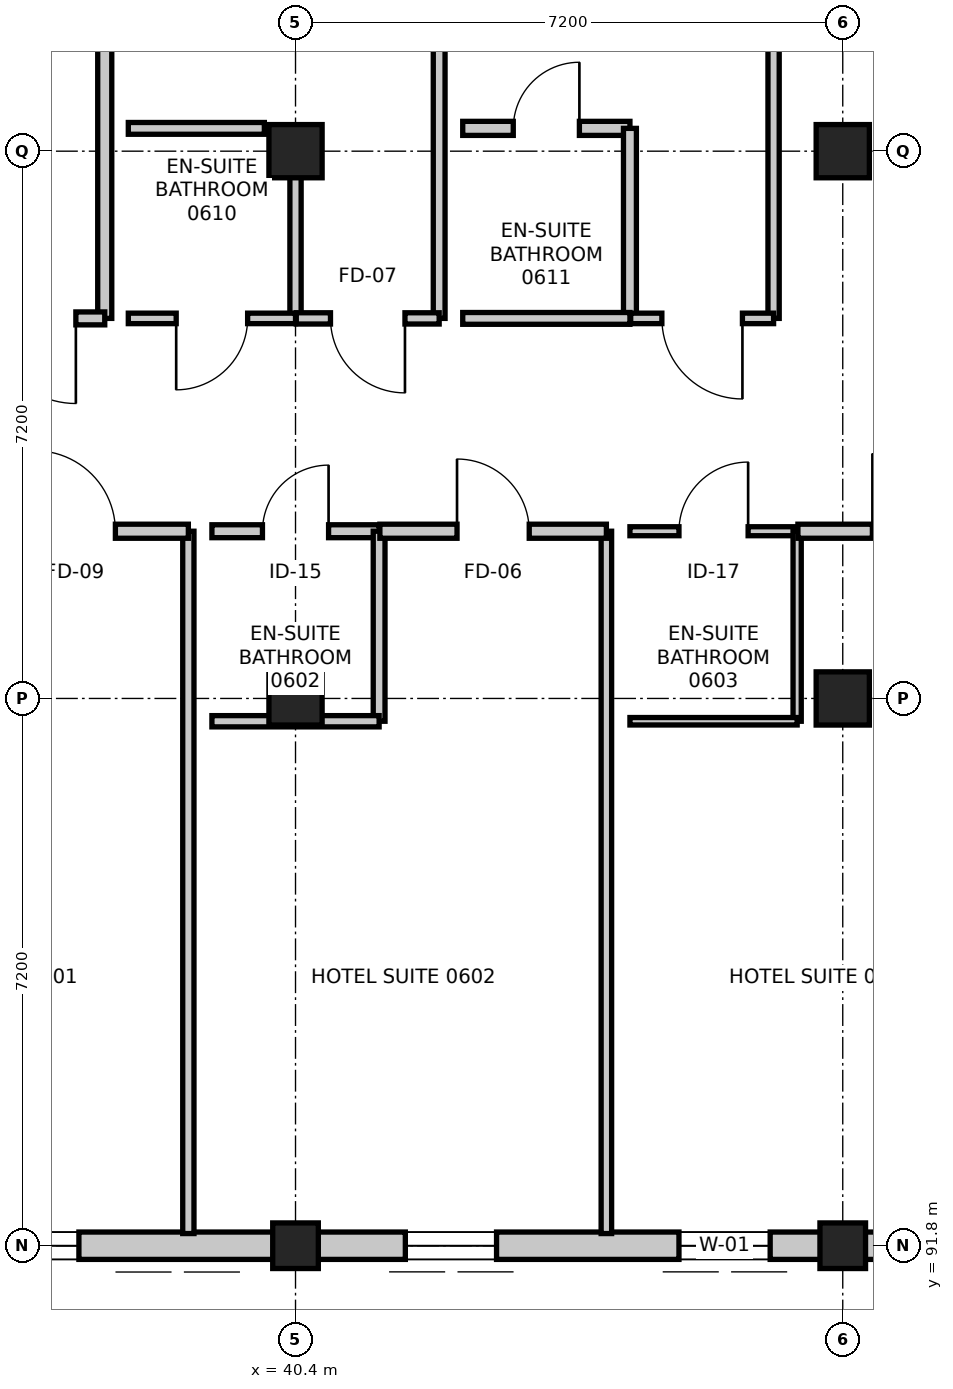
"""IFC4 building model, lengths in metres.
Left out: names, types, materials, properties, quantities, classifications, styles, units other than length and angle.
Written with IfcOpenShell. Run it as: python <this file> out.ifc"""

import sys

from ifc_helpers import new_model, si_unit, direction, frame, frame_2d, origin, origin_2d, place, context, subcontext, project, spatial, rectangle, extrude, element, fill, save


model = new_model("IFC4")
c1 = context("Model", 3, precision=1e-05, world=origin(), true_north=direction((0.0, 1.0)))
c2 = subcontext(c1, "Body", "Model", "MODEL_VIEW")
j1 = project(units=[si_unit("LENGTHUNIT", "METRE"), si_unit("PLANEANGLEUNIT", "RADIAN")], contexts=[c1])
p1 = place(None, origin())
s1 = spatial("IfcSite", under=j1, at=p1, CompositionType="ELEMENT")
p2 = place(p1, origin())
s2 = spatial("IfcBuilding", under=s1, at=p2, CompositionType="ELEMENT")
p3 = place(p2, frame((0.0, 0.0, 26.4)))
s3 = spatial("IfcBuildingStorey", under=s2, at=p3, CompositionType="ELEMENT", Elevation=26.4)
p4 = place(p3, frame((40.4, 91.8, 0.0), z_axis=(0.0, 0.0, 1.0), x_axis=(1.0, 0.0, 0.0)))
e1 = element("IfcColumn", 1, at=p4, inside=s3, PredefinedType="COLUMN", context=c2, shape_type="SweptSolid", body=[
    extrude(rectangle(XDim=0.6, YDim=0.6, at=origin_2d()), origin(), (0.0, 0.0, 1.0), 3.6),
])
for number, where, z_axis, x_axis in (
    (2, (40.4, 99.0, 0.0), (0.0, 0.0, 1.0), (1.0, 0.0, 0.0)),
    (3, (40.4, 106.2, 0.0), (0.0, 0.0, 1.0), (1.0, 0.0, 0.0)),
):
    element("IfcColumn", number, at=place(p3, frame(where, z_axis=z_axis, x_axis=x_axis)), inside=s3, PredefinedType="COLUMN", context=c2, shape_type="SweptSolid", body=[
        extrude(rectangle(XDim=0.7, YDim=0.7, at=origin_2d()), origin(), (0.0, 0.0, 1.0), 3.6),
    ])
p5 = place(p3, frame((47.6, 91.8, 0.0), z_axis=(0.0, 0.0, 1.0), x_axis=(1.0, 0.0, 0.0)))
e4 = element("IfcColumn", 4, at=p5, inside=s3, PredefinedType="COLUMN", context=c2, shape_type="SweptSolid", body=[
    extrude(rectangle(XDim=0.6, YDim=0.6, at=origin_2d()), origin(), (0.0, 0.0, 1.0), 3.6),
])
for number, where, z_axis, x_axis in (
    (5, (47.6, 99.0, 0.0), (0.0, 0.0, 1.0), (1.0, 0.0, 0.0)),
    (6, (47.6, 106.2, 0.0), (0.0, 0.0, 1.0), (1.0, 0.0, 0.0)),
):
    element("IfcColumn", number, at=place(p3, frame(where, z_axis=z_axis, x_axis=x_axis)), inside=s3, PredefinedType="COLUMN", context=c2, shape_type="SweptSolid", body=[
        extrude(rectangle(XDim=0.7, YDim=0.7, at=origin_2d()), origin(), (0.0, 0.0, 1.0), 3.6),
    ])
p6 = place(p3, frame((54.8, 91.8, 0.0), z_axis=(0.0, 0.0, 1.0), x_axis=(-1.0, 0.0, 0.0)))
e7 = element("IfcWall", 7, at=p6, inside=s3, PredefinedType="STANDARD", context=c2, shape_type="SweptSolid", body=[
    extrude(rectangle(XDim=7.2, YDim=0.36, at=frame_2d((3.6, 0.0))), origin(), (0.0, 0.0, 1.0), 2.735),
])
p7 = place(p6, frame((2.85, 0.0, 0.75)))
e8 = element("IfcOpeningElement", 8, at=p7, cuts=e7, PredefinedType="OPENING", context=c2, shape_type="SweptSolid", body=[
    extrude(rectangle(XDim=1.5, YDim=1.5, at=frame_2d((0.75, 0.75))), frame((0.0, 0.19, 0.0), z_axis=(0.0, -1.0, 0.0), x_axis=(1.0, 0.0, 0.0)), (0.0, 0.0, 1.0), 0.38),
])
p8 = place(p3, frame((47.6, 91.8, 0.0), z_axis=(0.0, 0.0, 1.0), x_axis=(-1.0, 0.0, 0.0)))
e9 = element("IfcWall", 9, at=p8, inside=s3, PredefinedType="STANDARD", context=c2, shape_type="SweptSolid", body=[
    extrude(rectangle(XDim=7.2, YDim=0.36, at=frame_2d((3.6, 0.0))), origin(), (0.0, 0.0, 1.0), 2.735),
])
p9 = place(p8, frame((0.955, 0.0, 0.75)))
e10 = element("IfcOpeningElement", 10, at=p9, cuts=e9, PredefinedType="OPENING", context=c2, shape_type="SweptSolid", body=[
    extrude(rectangle(XDim=1.2, YDim=1.5, at=frame_2d((0.6, 0.75))), frame((0.0, 0.19, 0.0), z_axis=(0.0, -1.0, 0.0), x_axis=(1.0, 0.0, 0.0)), (0.0, 0.0, 1.0), 0.38),
])
p10 = place(p8, frame((4.555, 0.0, 0.75)))
e11 = element("IfcOpeningElement", 11, at=p10, cuts=e9, PredefinedType="OPENING", context=c2, shape_type="SweptSolid", body=[
    extrude(rectangle(XDim=1.2, YDim=1.5, at=frame_2d((0.6, 0.75))), frame((0.0, 0.19, 0.0), z_axis=(0.0, -1.0, 0.0), x_axis=(1.0, 0.0, 0.0)), (0.0, 0.0, 1.0), 0.38),
])
p11 = place(p3, frame((40.4, 91.8, 0.0), z_axis=(0.0, 0.0, 1.0), x_axis=(-1.0, 0.0, 0.0)))
e12 = element("IfcWall", 12, at=p11, inside=s3, PredefinedType="STANDARD", context=c2, shape_type="SweptSolid", body=[
    extrude(rectangle(XDim=7.2, YDim=0.36, at=frame_2d((3.6, 0.0))), origin(), (0.0, 0.0, 1.0), 2.735),
])
p12 = place(p11, frame((2.85, 0.0, 0.75)))
e13 = element("IfcOpeningElement", 13, at=p12, cuts=e12, PredefinedType="OPENING", context=c2, shape_type="SweptSolid", body=[
    extrude(rectangle(XDim=1.5, YDim=1.5, at=frame_2d((0.75, 0.75))), frame((0.0, 0.19, 0.0), z_axis=(0.0, -1.0, 0.0), x_axis=(1.0, 0.0, 0.0)), (0.0, 0.0, 1.0), 0.38),
])
p13 = place(p3, frame((38.99, 101.2, 0.0), z_axis=(0.0, 0.0, 1.0), x_axis=(0.0, -1.0, 0.0)))
e14 = element("IfcWall", 14, at=p13, inside=s3, PredefinedType="PARTITIONING", context=c2, shape_type="SweptSolid", body=[
    extrude(rectangle(XDim=9.24, YDim=0.148, at=frame_2d((4.62, 0.0))), origin(), (0.0, 0.0, 1.0), 2.735),
])
p14 = place(p3, frame((36.01, 101.2, 0.0), z_axis=(0.0, 0.0, 1.0), x_axis=(1.0, 0.0, 0.0)))
e15 = element("IfcWall", 15, at=p14, inside=s3, PredefinedType="PARTITIONING", context=c2, shape_type="SweptSolid", body=[
    extrude(rectangle(XDim=2.98, YDim=0.185, at=frame_2d((1.49, 0.0))), origin(), (0.0, 0.0, 1.0), 3.35),
])
p15 = place(p14, frame((0.96, 0.0, 0.0)))
e16 = element("IfcOpeningElement", 16, at=p15, cuts=e15, PredefinedType="OPENING", context=c2, shape_type="SweptSolid", body=[
    extrude(rectangle(XDim=1.06, YDim=2.2, at=frame_2d((0.53, 1.1))), frame((0.0, 0.103, 0.0), z_axis=(0.0, -1.0, 0.0), x_axis=(1.0, 0.0, 0.0)), (0.0, 0.0, 1.0), 0.205),
])
p16 = place(p3, frame((39.3, 101.2, 0.0), z_axis=(0.0, 0.0, 1.0), x_axis=(1.0, 0.0, 0.0)))
e17 = element("IfcWall", 17, at=p16, inside=s3, PredefinedType="PARTITIONING", context=c2, shape_type="SweptSolid", body=[
    extrude(rectangle(XDim=2.2, YDim=0.17, at=frame_2d((1.1, 0.0))), origin(), (0.0, 0.0, 1.0), 2.685),
])
p17 = place(p16, frame((0.665, 0.0, 0.0)))
e18 = element("IfcOpeningElement", 18, at=p17, cuts=e17, PredefinedType="OPENING", context=c2, shape_type="SweptSolid", body=[
    extrude(rectangle(XDim=0.87, YDim=2.07, at=frame_2d((0.435, 1.035))), frame((0.0, 0.095, 0.0), z_axis=(0.0, -1.0, 0.0), x_axis=(1.0, 0.0, 0.0)), (0.0, 0.0, 1.0), 0.19),
])
p18 = place(p3, frame((41.5, 101.2, 0.0), z_axis=(0.0, 0.0, 1.0), x_axis=(0.0, -1.0, 0.0)))
e19 = element("IfcWall", 19, at=p18, inside=s3, PredefinedType="PARTITIONING", context=c2, shape_type="SweptSolid", body=[
    extrude(rectangle(XDim=2.5, YDim=0.155, at=frame_2d((1.25, 0.0))), origin(), (0.0, 0.0, 1.0), 2.735),
])
p19 = place(p3, frame((41.5, 98.7, 0.0), z_axis=(0.0, 0.0, 1.0), x_axis=(-1.0, 0.0, 0.0)))
e20 = element("IfcWall", 20, at=p19, inside=s3, PredefinedType="PARTITIONING", context=c2, shape_type="SweptSolid", body=[
    extrude(rectangle(XDim=2.2, YDim=0.148, at=frame_2d((1.1, 0.0))), origin(), (0.0, 0.0, 1.0), 2.685),
])
p20 = place(p3, frame((44.49, 101.2, 0.0), z_axis=(0.0, 0.0, 1.0), x_axis=(0.0, -1.0, 0.0)))
e21 = element("IfcWall", 21, at=p20, inside=s3, PredefinedType="PARTITIONING", context=c2, shape_type="SweptSolid", body=[
    extrude(rectangle(XDim=9.24, YDim=0.138, at=frame_2d((4.62, 0.0))), origin(), (0.0, 0.0, 1.0), 2.735),
])
p21 = place(p3, frame((41.51, 101.2, 0.0), z_axis=(0.0, 0.0, 1.0), x_axis=(1.0, 0.0, 0.0)))
e22 = element("IfcWall", 22, at=p21, inside=s3, PredefinedType="PARTITIONING", context=c2, shape_type="SweptSolid", body=[
    extrude(rectangle(XDim=2.98, YDim=0.185, at=frame_2d((1.49, 0.0))), origin(), (0.0, 0.0, 1.0), 3.35),
])
p22 = place(p21, frame((1.015, 0.0, 0.0)))
e23 = element("IfcOpeningElement", 23, at=p22, cuts=e22, PredefinedType="OPENING", context=c2, shape_type="SweptSolid", body=[
    extrude(rectangle(XDim=0.95, YDim=2.1, at=frame_2d((0.475, 1.05))), frame((0.0, 0.103, 0.0), z_axis=(0.0, -1.0, 0.0), x_axis=(1.0, 0.0, 0.0)), (0.0, 0.0, 1.0), 0.205),
])
p23 = place(p3, frame((44.8, 101.2, 0.0), z_axis=(0.0, 0.0, 1.0), x_axis=(1.0, 0.0, 0.0)))
e24 = element("IfcWall", 24, at=p23, inside=s3, PredefinedType="PARTITIONING", context=c2, shape_type="SweptSolid", body=[
    extrude(rectangle(XDim=2.2, YDim=0.118, at=frame_2d((1.1, 0.0))), origin(), (0.0, 0.0, 1.0), 3.35),
])
p24 = place(p23, frame((0.645, 0.0, 0.0)))
e25 = element("IfcOpeningElement", 25, at=p24, cuts=e24, PredefinedType="OPENING", context=c2, shape_type="SweptSolid", body=[
    extrude(rectangle(XDim=0.91, YDim=2.11, at=frame_2d((0.455, 1.055))), frame((0.0, 0.069, 0.0), z_axis=(0.0, -1.0, 0.0), x_axis=(1.0, 0.0, 0.0)), (0.0, 0.0, 1.0), 0.138),
])
p25 = place(p3, frame((47.0, 101.2, 0.0), z_axis=(0.0, 0.0, 1.0), x_axis=(0.0, -1.0, 0.0)))
e26 = element("IfcWall", 26, at=p25, inside=s3, PredefinedType="PARTITIONING", context=c2, shape_type="SweptSolid", body=[
    extrude(rectangle(XDim=2.5, YDim=0.108, at=frame_2d((1.25, 0.0))), origin(), (0.0, 0.0, 1.0), 2.735),
])
p26 = place(p3, frame((47.0, 98.7, 0.0), z_axis=(0.0, 0.0, 1.0), x_axis=(-1.0, 0.0, 0.0)))
e27 = element("IfcWall", 27, at=p26, inside=s3, PredefinedType="PARTITIONING", context=c2, shape_type="SweptSolid", body=[
    extrude(rectangle(XDim=2.2, YDim=0.098, at=frame_2d((1.1, 0.0))), origin(), (0.0, 0.0, 1.0), 3.35),
])
p27 = place(p3, frame((47.01, 101.2, 0.0), z_axis=(0.0, 0.0, 1.0), x_axis=(1.0, 0.0, 0.0)))
e28 = element("IfcWall", 28, at=p27, inside=s3, PredefinedType="PARTITIONING", context=c2, shape_type="SweptSolid", body=[
    extrude(rectangle(XDim=2.98, YDim=0.185, at=frame_2d((1.49, 0.0))), origin(), (0.0, 0.0, 1.0), 2.685),
])
p28 = place(p27, frame((0.98, 0.0, 0.0)))
e29 = element("IfcOpeningElement", 29, at=p28, cuts=e28, PredefinedType="OPENING", context=c2, shape_type="SweptSolid", body=[
    extrude(rectangle(XDim=1.02, YDim=2.15, at=frame_2d((0.51, 1.075))), frame((0.0, 0.103, 0.0), z_axis=(0.0, -1.0, 0.0), x_axis=(1.0, 0.0, 0.0)), (0.0, 0.0, 1.0), 0.205),
])
p29 = place(p3, frame((37.89, 113.087, 0.0), z_axis=(0.0, 0.0, 1.0), x_axis=(0.0, -1.0, 0.0)))
e30 = element("IfcWall", 30, at=p29, inside=s3, PredefinedType="PARTITIONING", context=c2, shape_type="SweptSolid", body=[
    extrude(rectangle(XDim=9.087, YDim=0.185, at=frame_2d((4.543, 0.0))), origin(), (0.0, 0.0, 1.0), 2.735),
])
p30 = place(p3, frame((37.89, 104.0, 0.0), z_axis=(0.0, 0.0, 1.0), x_axis=(-1.0, 0.0, 0.0)))
e31 = element("IfcWall", 31, at=p30, inside=s3, PredefinedType="PARTITIONING", context=c2, shape_type="SweptSolid", body=[
    extrude(rectangle(XDim=1.88, YDim=0.17, at=frame_2d((0.94, 0.0))), origin(), (0.0, 0.0, 1.0), 3.35),
])
p31 = place(p30, frame((0.38, 0.0, 0.0)))
e32 = element("IfcOpeningElement", 32, at=p31, cuts=e31, PredefinedType="OPENING", context=c2, shape_type="SweptSolid", body=[
    extrude(rectangle(XDim=1.12, YDim=2.2, at=frame_2d((0.56, 1.1))), frame((0.0, 0.095, 0.0), z_axis=(0.0, -1.0, 0.0), x_axis=(1.0, 0.0, 0.0)), (0.0, 0.0, 1.0), 0.19),
])
p32 = place(p3, frame((38.2, 106.5, 0.0), z_axis=(0.0, 0.0, 1.0), x_axis=(1.0, 0.0, 0.0)))
e33 = element("IfcWall", 33, at=p32, inside=s3, PredefinedType="PARTITIONING", context=c2, shape_type="SweptSolid", body=[
    extrude(rectangle(XDim=1.79, YDim=0.155, at=frame_2d((0.895, 0.0))), origin(), (0.0, 0.0, 1.0), 3.35),
])
p33 = place(p3, frame((40.4, 106.09, 0.0), z_axis=(0.0, 0.0, 1.0), x_axis=(0.0, -1.0, 0.0)))
e34 = element("IfcWall", 34, at=p33, inside=s3, PredefinedType="PARTITIONING", context=c2, shape_type="SweptSolid", body=[
    extrude(rectangle(XDim=2.09, YDim=0.148, at=frame_2d((1.045, 0.0))), origin(), (0.0, 0.0, 1.0), 2.685),
])
p34 = place(p3, frame((40.4, 104.0, 0.0), z_axis=(0.0, 0.0, 1.0), x_axis=(-1.0, 0.0, 0.0)))
e35 = element("IfcWall", 35, at=p34, inside=s3, PredefinedType="PARTITIONING", context=c2, shape_type="SweptSolid", body=[
    extrude(rectangle(XDim=2.2, YDim=0.138, at=frame_2d((1.1, 0.0))), origin(), (0.0, 0.0, 1.0), 2.685),
])
p35 = place(p34, frame((0.63, 0.0, 0.0)))
e36 = element("IfcOpeningElement", 36, at=p35, cuts=e35, PredefinedType="OPENING", context=c2, shape_type="SweptSolid", body=[
    extrude(rectangle(XDim=0.94, YDim=2.12, at=frame_2d((0.47, 1.06))), frame((0.0, 0.079, 0.0), z_axis=(0.0, -1.0, 0.0), x_axis=(1.0, 0.0, 0.0)), (0.0, 0.0, 1.0), 0.158),
])
p36 = place(p3, frame((42.29, 113.304, 0.0), z_axis=(0.0, 0.0, 1.0), x_axis=(0.0, -1.0, 0.0)))
e37 = element("IfcWall", 37, at=p36, inside=s3, PredefinedType="PARTITIONING", context=c2, shape_type="SweptSolid", body=[
    extrude(rectangle(XDim=9.304, YDim=0.155, at=frame_2d((4.652, 0.0))), origin(), (0.0, 0.0, 1.0), 2.735),
])
p37 = place(p3, frame((42.29, 104.0, 0.0), z_axis=(0.0, 0.0, 1.0), x_axis=(-1.0, 0.0, 0.0)))
e38 = element("IfcWall", 38, at=p37, inside=s3, PredefinedType="PARTITIONING", context=c2, shape_type="SweptSolid", body=[
    extrude(rectangle(XDim=1.88, YDim=0.148, at=frame_2d((0.94, 0.0))), origin(), (0.0, 0.0, 1.0), 2.685),
])
p38 = place(p37, frame((0.45, 0.0, 0.0)))
e39 = element("IfcOpeningElement", 39, at=p38, cuts=e38, PredefinedType="OPENING", context=c2, shape_type="SweptSolid", body=[
    extrude(rectangle(XDim=0.98, YDim=2.15, at=frame_2d((0.49, 1.075))), frame((0.0, 0.084, 0.0), z_axis=(0.0, -1.0, 0.0), x_axis=(1.0, 0.0, 0.0)), (0.0, 0.0, 1.0), 0.168),
])
p39 = place(p3, frame((42.6, 106.5, 0.0), z_axis=(0.0, 0.0, 1.0), x_axis=(1.0, 0.0, 0.0)))
e40 = element("IfcWall", 40, at=p39, inside=s3, PredefinedType="PARTITIONING", context=c2, shape_type="SweptSolid", body=[
    extrude(rectangle(XDim=2.2, YDim=0.185, at=frame_2d((1.1, 0.0))), origin(), (0.0, 0.0, 1.0), 2.735),
])
p40 = place(p39, frame((0.665, 0.0, 0.0)))
e41 = element("IfcOpeningElement", 41, at=p40, cuts=e40, PredefinedType="OPENING", context=c2, shape_type="SweptSolid", body=[
    extrude(rectangle(XDim=0.87, YDim=2.07, at=frame_2d((0.435, 1.035))), frame((0.0, 0.103, 0.0), z_axis=(0.0, -1.0, 0.0), x_axis=(1.0, 0.0, 0.0)), (0.0, 0.0, 1.0), 0.205),
])
p41 = place(p3, frame((44.8, 106.5, 0.0), z_axis=(0.0, 0.0, 1.0), x_axis=(0.0, -1.0, 0.0)))
e42 = element("IfcWall", 42, at=p41, inside=s3, PredefinedType="PARTITIONING", context=c2, shape_type="SweptSolid", body=[
    extrude(rectangle(XDim=2.5, YDim=0.17, at=frame_2d((1.25, 0.0))), origin(), (0.0, 0.0, 1.0), 2.735),
])
p42 = place(p3, frame((44.8, 104.0, 0.0), z_axis=(0.0, 0.0, 1.0), x_axis=(-1.0, 0.0, 0.0)))
e43 = element("IfcWall", 43, at=p42, inside=s3, PredefinedType="PARTITIONING", context=c2, shape_type="SweptSolid", body=[
    extrude(rectangle(XDim=2.2, YDim=0.155, at=frame_2d((1.1, 0.0))), origin(), (0.0, 0.0, 1.0), 3.35),
])
p43 = place(p3, frame((46.69, 113.568, 0.0), z_axis=(0.0, 0.0, 1.0), x_axis=(0.0, -1.0, 0.0)))
e44 = element("IfcWall", 44, at=p43, inside=s3, PredefinedType="PARTITIONING", context=c2, shape_type="SweptSolid", body=[
    extrude(rectangle(XDim=9.568, YDim=0.148, at=frame_2d((4.784, 0.0))), origin(), (0.0, 0.0, 1.0), 2.735),
])
p44 = place(p3, frame((46.69, 104.0, 0.0), z_axis=(0.0, 0.0, 1.0), x_axis=(-1.0, 0.0, 0.0)))
e45 = element("IfcWall", 45, at=p44, inside=s3, PredefinedType="PARTITIONING", context=c2, shape_type="SweptSolid", body=[
    extrude(rectangle(XDim=1.88, YDim=0.138, at=frame_2d((0.94, 0.0))), origin(), (0.0, 0.0, 1.0), 3.35),
])
p45 = place(p44, frame((0.41, 0.0, 0.0)))
e46 = element("IfcOpeningElement", 46, at=p45, cuts=e45, PredefinedType="OPENING", context=c2, shape_type="SweptSolid", body=[
    extrude(rectangle(XDim=1.06, YDim=2.2, at=frame_2d((0.53, 1.1))), frame((0.0, 0.079, 0.0), z_axis=(0.0, -1.0, 0.0), x_axis=(1.0, 0.0, 0.0)), (0.0, 0.0, 1.0), 0.158),
])
p46 = place(p9, origin())
e47 = element("IfcWindow", 47, at=p46, inside=s3, PartitioningType="SINGLE_PANEL", PredefinedType="WINDOW", context=c2, shape_type="SweptSolid", body=[
    extrude(rectangle(XDim=1.2, YDim=1.5, at=frame_2d((0.6, 0.75))), frame((0.0, 0.03, 0.0), z_axis=(0.0, -1.0, 0.0), x_axis=(1.0, 0.0, 0.0)), (0.0, 0.0, 1.0), 0.06),
])
fill(e10, e47)
p47 = place(p12, origin())
e48 = element("IfcWindow", 48, at=p47, inside=s3, PartitioningType="SINGLE_PANEL", PredefinedType="WINDOW", context=c2, shape_type="SweptSolid", body=[
    extrude(rectangle(XDim=1.5, YDim=1.5, at=frame_2d((0.75, 0.75))), frame((0.0, 0.03, 0.0), z_axis=(0.0, -1.0, 0.0), x_axis=(1.0, 0.0, 0.0)), (0.0, 0.0, 1.0), 0.06),
])
fill(e13, e48)
p48 = place(p15, origin())
e49 = element("IfcDoor", 49, at=p48, inside=s3, OperationType="SINGLE_SWING_LEFT", PredefinedType="DOOR", context=c2, shape_type="SweptSolid", body=[
    extrude(rectangle(XDim=1.06, YDim=2.2, at=frame_2d((0.53, 1.1))), frame((0.0, 0.025, 0.0), z_axis=(0.0, -1.0, 0.0), x_axis=(1.0, 0.0, 0.0)), (0.0, 0.0, 1.0), 0.05),
])
fill(e16, e49)
p49 = place(p17, origin())
e50 = element("IfcDoor", 50, at=p49, inside=s3, OperationType="SINGLE_SWING_RIGHT", PredefinedType="DOOR", context=c2, shape_type="SweptSolid", body=[
    extrude(rectangle(XDim=0.87, YDim=2.07, at=frame_2d((0.435, 1.035))), frame((0.0, 0.025, 0.0), z_axis=(0.0, -1.0, 0.0), x_axis=(1.0, 0.0, 0.0)), (0.0, 0.0, 1.0), 0.05),
])
fill(e18, e50)
p50 = place(p22, origin())
e51 = element("IfcDoor", 51, at=p50, inside=s3, OperationType="SINGLE_SWING_LEFT", PredefinedType="DOOR", context=c2, shape_type="SweptSolid", body=[
    extrude(rectangle(XDim=0.95, YDim=2.1, at=frame_2d((0.475, 1.05))), frame((0.0, 0.025, 0.0), z_axis=(0.0, -1.0, 0.0), x_axis=(1.0, 0.0, 0.0)), (0.0, 0.0, 1.0), 0.05),
])
fill(e23, e51)
p51 = place(p24, origin())
e52 = element("IfcDoor", 52, at=p51, inside=s3, OperationType="SINGLE_SWING_RIGHT", PredefinedType="DOOR", context=c2, shape_type="SweptSolid", body=[
    extrude(rectangle(XDim=0.91, YDim=2.11, at=frame_2d((0.455, 1.055))), frame((0.0, 0.025, 0.0), z_axis=(0.0, -1.0, 0.0), x_axis=(1.0, 0.0, 0.0)), (0.0, 0.0, 1.0), 0.05),
])
fill(e25, e52)
p52 = place(p28, origin())
e53 = element("IfcDoor", 53, at=p52, inside=s3, OperationType="SINGLE_SWING_LEFT", PredefinedType="DOOR", context=c2, shape_type="SweptSolid", body=[
    extrude(rectangle(XDim=1.02, YDim=2.15, at=frame_2d((0.51, 1.075))), frame((0.0, 0.025, 0.0), z_axis=(0.0, -1.0, 0.0), x_axis=(1.0, 0.0, 0.0)), (0.0, 0.0, 1.0), 0.05),
])
fill(e29, e53)
p53 = place(p31, origin())
e54 = element("IfcDoor", 54, at=p53, inside=s3, OperationType="SINGLE_SWING_LEFT", PredefinedType="DOOR", context=c2, shape_type="SweptSolid", body=[
    extrude(rectangle(XDim=1.12, YDim=2.2, at=frame_2d((0.56, 1.1))), frame((0.0, 0.025, 0.0), z_axis=(0.0, -1.0, 0.0), x_axis=(1.0, 0.0, 0.0)), (0.0, 0.0, 1.0), 0.05),
])
fill(e32, e54)
p54 = place(p35, origin())
e55 = element("IfcDoor", 55, at=p54, inside=s3, OperationType="SINGLE_SWING_RIGHT", PredefinedType="DOOR", context=c2, shape_type="SweptSolid", body=[
    extrude(rectangle(XDim=0.94, YDim=2.12, at=frame_2d((0.47, 1.06))), frame((0.0, 0.025, 0.0), z_axis=(0.0, -1.0, 0.0), x_axis=(1.0, 0.0, 0.0)), (0.0, 0.0, 1.0), 0.05),
])
fill(e36, e55)
p55 = place(p38, origin())
e56 = element("IfcDoor", 56, at=p55, inside=s3, OperationType="SINGLE_SWING_LEFT", PredefinedType="DOOR", context=c2, shape_type="SweptSolid", body=[
    extrude(rectangle(XDim=0.98, YDim=2.15, at=frame_2d((0.49, 1.075))), frame((0.0, 0.025, 0.0), z_axis=(0.0, -1.0, 0.0), x_axis=(1.0, 0.0, 0.0)), (0.0, 0.0, 1.0), 0.05),
])
fill(e39, e56)
p56 = place(p40, origin())
e57 = element("IfcDoor", 57, at=p56, inside=s3, OperationType="SINGLE_SWING_RIGHT", PredefinedType="DOOR", context=c2, shape_type="SweptSolid", body=[
    extrude(rectangle(XDim=0.87, YDim=2.07, at=frame_2d((0.435, 1.035))), frame((0.0, 0.025, 0.0), z_axis=(0.0, -1.0, 0.0), x_axis=(1.0, 0.0, 0.0)), (0.0, 0.0, 1.0), 0.05),
])
fill(e41, e57)
p57 = place(p45, origin())
e58 = element("IfcDoor", 58, at=p57, inside=s3, OperationType="SINGLE_SWING_LEFT", PredefinedType="DOOR", context=c2, shape_type="SweptSolid", body=[
    extrude(rectangle(XDim=1.06, YDim=2.2, at=frame_2d((0.53, 1.1))), frame((0.0, 0.025, 0.0), z_axis=(0.0, -1.0, 0.0), x_axis=(1.0, 0.0, 0.0)), (0.0, 0.0, 1.0), 0.05),
])
fill(e46, e58)
p58 = place(p10, origin())
e59 = element("IfcWindow", 59, at=p58, inside=s3, PartitioningType="SINGLE_PANEL", PredefinedType="WINDOW", context=c2, shape_type="SweptSolid", body=[
    extrude(rectangle(XDim=1.2, YDim=1.5, at=frame_2d((0.6, 0.75))), frame((0.0, 0.03, 0.0), z_axis=(0.0, -1.0, 0.0), x_axis=(1.0, 0.0, 0.0)), (0.0, 0.0, 1.0), 0.06),
])
fill(e11, e59)
save(model, sys.argv[1])
